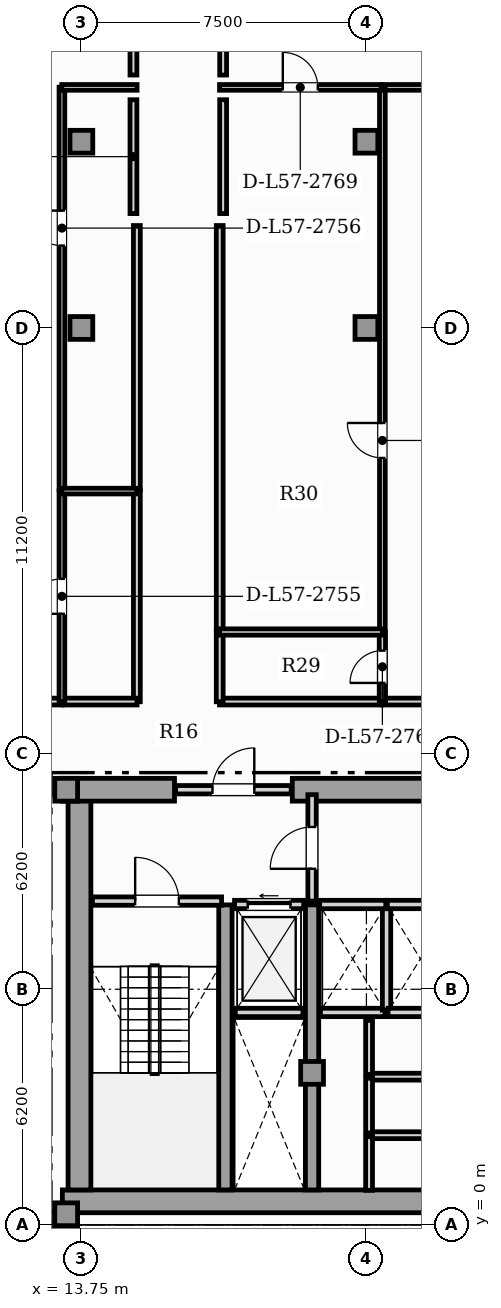
"""IFC4 building model, lengths in metres.
Left out: names, types, materials, properties, quantities, classifications, styles, units other than length and angle.
Written with IfcOpenShell. Run it as: python <this file> out.ifc"""

import sys

from ifc_helpers import new_model, si_unit, direction, frame, frame_2d, origin, origin_2d, place, context, subcontext, project, spatial, rectangle, extrude, element, fill, save


model = new_model("IFC4")
c1 = context("Model", 3, precision=1e-05, world=origin(), true_north=direction((0.0, 1.0)))
c2 = subcontext(c1, "Body", "Model", "MODEL_VIEW")
j1 = project(units=[si_unit("LENGTHUNIT", "METRE"), si_unit("PLANEANGLEUNIT", "RADIAN")], contexts=[c1])
p1 = place(None, origin())
s1 = spatial("IfcSite", under=j1, at=p1, CompositionType="ELEMENT")
p2 = place(p1, origin())
s2 = spatial("IfcBuilding", under=s1, at=p2, CompositionType="ELEMENT")
p3 = place(p2, frame((0.0, 0.0, 231.1)))
s3 = spatial("IfcBuildingStorey", under=s2, at=p3, CompositionType="ELEMENT", Elevation=231.1)
p4 = place(p3, frame((13.25, 0.62, 0.0), z_axis=(0.0, 0.0, 1.0), x_axis=(1.0, 0.0, 0.0)))
e1 = element("IfcWall", 1, at=p4, inside=s3, PredefinedType="SHEAR", context=c2, shape_type="SweptSolid", body=[
    extrude(rectangle(XDim=31.0, YDim=0.6, at=frame_2d((15.5, 0.0))), origin(), (0.0, 0.0, 1.0), 3.63),
])
p5 = place(p3, frame((13.7, 0.92, 0.0), z_axis=(0.0, 0.0, 1.0), x_axis=(0.0, 1.0, 0.0)))
e2 = element("IfcWall", 2, at=p5, inside=s3, PredefinedType="SHEAR", context=c2, shape_type="SweptSolid", body=[
    extrude(rectangle(XDim=10.53, YDim=0.6, at=frame_2d((5.265, 0.0))), origin(), (0.0, 0.0, 1.0), 3.63),
])
p6 = place(p3, frame((13.25, 11.45, 0.0), z_axis=(0.0, 0.0, 1.0), x_axis=(1.0, 0.0, 0.0)))
e3 = element("IfcWall", 3, at=p6, inside=s3, PredefinedType="SHEAR", context=c2, shape_type="SweptSolid", body=[
    extrude(rectangle(XDim=2.95, YDim=0.6, at=frame_2d((1.475, 0.0))), origin(), (0.0, 0.0, 1.0), 3.63),
])
p7 = place(p3, frame((19.3, 11.45, 0.0), z_axis=(0.0, 0.0, 1.0), x_axis=(1.0, 0.0, 0.0)))
e4 = element("IfcWall", 4, at=p7, inside=s3, PredefinedType="SHEAR", context=c2, shape_type="SweptSolid", body=[
    extrude(rectangle(XDim=7.3, YDim=0.6, at=frame_2d((3.65, 0.0))), origin(), (0.0, 0.0, 1.0), 3.63),
])
for number, where, z_axis, x_axis in (
    (5, (17.54, 0.92, 0.0), (0.0, 0.0, 1.0), (0.0, 1.0, 0.0)),
    (6, (19.82, 0.92, 0.0), (0.0, 0.0, 1.0), (0.0, 1.0, 0.0)),
):
    element("IfcWall", number, at=place(p3, frame(where, z_axis=z_axis, x_axis=x_axis)), inside=s3, PredefinedType="SHEAR", context=c2, shape_type="SweptSolid", body=[
        extrude(rectangle(XDim=7.5, YDim=0.35, at=frame_2d((3.75, 0.0))), origin(), (0.0, 0.0, 1.0), 3.63),
    ])
for number, where, z_axis, x_axis in (
    (7, (13.35, 0.28, 0.0), (0.0, 0.0, 1.0), (1.0, 0.0, 0.0)),
    (8, (13.35, 11.45, 0.0), (0.0, 0.0, 1.0), (1.0, 0.0, 0.0)),
    (9, (19.82, 4.0, 0.0), (0.0, 0.0, 1.0), (1.0, 0.0, 0.0)),
    (10, (13.75, 23.6, 0.0), (0.0, 0.0, 1.0), (1.0, 0.0, 0.0)),
    (11, (21.25, 23.6, 0.0), (0.0, 0.0, 1.0), (1.0, 0.0, 0.0)),
    (12, (13.75, 28.5, 0.0), (0.0, 0.0, 1.0), (1.0, 0.0, 0.0)),
    (13, (21.25, 28.5, 0.0), (0.0, 0.0, 1.0), (1.0, 0.0, 0.0)),
):
    element("IfcColumn", number, at=place(p3, frame(where, z_axis=z_axis, x_axis=x_axis)), inside=s3, PredefinedType="COLUMN", context=c2, shape_type="SweptSolid", body=[
        extrude(rectangle(XDim=0.6, YDim=0.6, at=origin_2d()), origin(), (0.0, 0.0, 1.0), 3.85),
    ])
p8 = place(p3, frame((10.74, 0.18, 0.0), z_axis=(0.0, 0.0, 1.0), x_axis=(1.0, 0.0, 0.0)))
e14 = element("IfcWall", 14, at=p8, inside=s3, PredefinedType="SOLIDWALL", context=c2, shape_type="SweptSolid", body=[
    extrude(rectangle(XDim=2.51, YDim=0.3, at=frame_2d((1.255, 0.0))), origin(), (0.0, 0.0, 1.0), 3.63),
])
p9 = place(p3, frame((17.8, 5.59, 0.0), z_axis=(0.0, 0.0, 1.0), x_axis=(1.0, 0.0, 0.0)))
e15 = element("IfcWall", 15, at=p9, inside=s3, PredefinedType="SOLIDWALL", context=c2, shape_type="SweptSolid", body=[
    extrude(rectangle(XDim=1.78, YDim=0.22, at=frame_2d((0.89, 0.0))), origin(), (0.0, 0.0, 1.0), 3.63),
])
p10 = place(p3, frame((17.78, 8.43, 0.0), z_axis=(0.0, 0.0, 1.0), x_axis=(1.0, 0.0, 0.0)))
e16 = element("IfcWall", 16, at=p10, inside=s3, PredefinedType="SOLIDWALL", context=c2, shape_type="SweptSolid", body=[
    extrude(rectangle(XDim=1.82, YDim=0.22, at=frame_2d((0.91, 0.0))), origin(), (0.0, 0.0, 1.0), 3.63),
])
p11 = place(p10, frame((0.35, 0.0, 0.0)))
e17 = element("IfcOpeningElement", 17, at=p11, cuts=e16, PredefinedType="OPENING", context=c2, shape_type="SweptSolid", body=[
    extrude(rectangle(XDim=1.12, YDim=2.25, at=frame_2d((0.56, 1.125))), frame((0.0, 0.12, 0.0), z_axis=(0.0, -1.0, 0.0), x_axis=(1.0, 0.0, 0.0)), (0.0, 0.0, 1.0), 0.24),
])
p12 = place(p3, frame((20.04, 5.59, 0.0), z_axis=(0.0, 0.0, 1.0), x_axis=(1.0, 0.0, 0.0)))
e18 = element("IfcWall", 18, at=p12, inside=s3, PredefinedType="SOLIDWALL", context=c2, shape_type="SweptSolid", body=[
    extrude(rectangle(XDim=1.7, YDim=0.22, at=frame_2d((0.85, 0.0))), origin(), (0.0, 0.0, 1.0), 3.63),
])
p13 = place(p3, frame((21.78, 5.65, 0.0), z_axis=(0.0, 0.0, 1.0), x_axis=(0.0, 1.0, 0.0)))
e19 = element("IfcWall", 19, at=p13, inside=s3, PredefinedType="SOLIDWALL", context=c2, shape_type="SweptSolid", body=[
    extrude(rectangle(XDim=2.7, YDim=0.22, at=frame_2d((1.35, 0.0))), origin(), (0.0, 0.0, 1.0), 3.63),
])
p14 = place(p3, frame((20.02, 8.43, 0.0), z_axis=(0.0, 0.0, 1.0), x_axis=(1.0, 0.0, 0.0)))
e20 = element("IfcWall", 20, at=p14, inside=s3, PredefinedType="SOLIDWALL", context=c2, shape_type="SweptSolid", body=[
    extrude(rectangle(XDim=1.74, YDim=0.22, at=frame_2d((0.87, 0.0))), origin(), (0.0, 0.0, 1.0), 3.63),
])
p15 = place(p3, frame((21.82, 5.59, 0.0), z_axis=(0.0, 0.0, 1.0), x_axis=(1.0, 0.0, 0.0)))
e21 = element("IfcWall", 21, at=p15, inside=s3, PredefinedType="SOLIDWALL", context=c2, shape_type="SweptSolid", body=[
    extrude(rectangle(XDim=1.7, YDim=0.22, at=frame_2d((0.85, 0.0))), origin(), (0.0, 0.0, 1.0), 3.63),
])
p16 = place(p3, frame((21.8, 8.43, 0.0), z_axis=(0.0, 0.0, 1.0), x_axis=(1.0, 0.0, 0.0)))
e22 = element("IfcWall", 22, at=p16, inside=s3, PredefinedType="SOLIDWALL", context=c2, shape_type="SweptSolid", body=[
    extrude(rectangle(XDim=1.74, YDim=0.22, at=frame_2d((0.87, 0.0))), origin(), (0.0, 0.0, 1.0), 3.63),
])
p17 = place(p3, frame((14.04, 8.52, 0.0), z_axis=(0.0, 0.0, 1.0), x_axis=(1.0, 0.0, 0.0)))
e23 = element("IfcWall", 23, at=p17, inside=s3, PredefinedType="SOLIDWALL", context=c2, shape_type="SweptSolid", body=[
    extrude(rectangle(XDim=3.4, YDim=0.22, at=frame_2d((1.7, 0.0))), origin(), (0.0, 0.0, 1.0), 3.63),
])
p18 = place(p17, frame((1.125, 0.0, 0.0)))
e24 = element("IfcOpeningElement", 24, at=p18, cuts=e23, PredefinedType="OPENING", context=c2, shape_type="SweptSolid", body=[
    extrude(rectangle(XDim=1.15, YDim=2.2, at=frame_2d((0.575, 1.1))), frame((0.0, 0.12, 0.0), z_axis=(0.0, -1.0, 0.0), x_axis=(1.0, 0.0, 0.0)), (0.0, 0.0, 1.0), 0.24),
])
p19 = place(p3, frame((19.82, 8.52, 0.0), z_axis=(0.0, 0.0, 1.0), x_axis=(0.0, 1.0, 0.0)))
e25 = element("IfcWall", 25, at=p19, inside=s3, PredefinedType="SOLIDWALL", context=c2, shape_type="SweptSolid", body=[
    extrude(rectangle(XDim=2.8, YDim=0.22, at=frame_2d((1.4, 0.0))), origin(), (0.0, 0.0, 1.0), 3.085),
])
p20 = place(p19, frame((0.85, 0.0, 0.0)))
e26 = element("IfcOpeningElement", 26, at=p20, cuts=e25, PredefinedType="OPENING", context=c2, shape_type="SweptSolid", body=[
    extrude(rectangle(XDim=1.1, YDim=2.2, at=frame_2d((0.55, 1.1))), frame((0.0, 0.12, 0.0), z_axis=(0.0, -1.0, 0.0), x_axis=(1.0, 0.0, 0.0)), (0.0, 0.0, 1.0), 0.24),
])
p21 = place(p3, frame((16.23, 11.45, 0.0), z_axis=(0.0, 0.0, 1.0), x_axis=(1.0, 0.0, 0.0)))
e27 = element("IfcWall", 27, at=p21, inside=s3, PredefinedType="SOLIDWALL", context=c2, shape_type="SweptSolid", body=[
    extrude(rectangle(XDim=3.04, YDim=0.22, at=frame_2d((1.52, 0.0))), origin(), (0.0, 0.0, 1.0), 3.63),
])
p22 = place(p21, frame((0.97, 0.0, 0.0)))
e28 = element("IfcOpeningElement", 28, at=p22, cuts=e27, PredefinedType="OPENING", context=c2, shape_type="SweptSolid", body=[
    extrude(rectangle(XDim=1.1, YDim=2.2, at=frame_2d((0.55, 1.1))), frame((0.0, 0.12, 0.0), z_axis=(0.0, -1.0, 0.0), x_axis=(1.0, 0.0, 0.0)), (0.0, 0.0, 1.0), 0.24),
])
p23 = place(p3, frame((21.36, 2.36, 0.0), z_axis=(0.0, 0.0, 1.0), x_axis=(1.0, 0.0, 0.0)))
e29 = element("IfcWall", 29, at=p23, inside=s3, PredefinedType="PARTITIONING", context=c2, shape_type="SweptSolid", body=[
    extrude(rectangle(XDim=3.94, YDim=0.18, at=frame_2d((1.97, 0.0))), origin(), (0.0, 0.0, 1.0), 3.63),
])
p24 = place(p3, frame((21.32, 0.91, 0.0), z_axis=(0.0, 0.0, 1.0), x_axis=(0.0, 1.0, 0.0)))
e30 = element("IfcWall", 30, at=p24, inside=s3, PredefinedType="PARTITIONING", context=c2, shape_type="SweptSolid", body=[
    extrude(rectangle(XDim=1.41, YDim=0.18, at=frame_2d((0.705, 0.0))), origin(), (0.0, 0.0, 1.0), 3.63),
])
p25 = place(p3, frame((21.36, 3.9, 0.0), z_axis=(0.0, 0.0, 1.0), x_axis=(1.0, 0.0, 0.0)))
e31 = element("IfcWall", 31, at=p25, inside=s3, PredefinedType="PARTITIONING", context=c2, shape_type="SweptSolid", body=[
    extrude(rectangle(XDim=3.94, YDim=0.18, at=frame_2d((1.97, 0.0))), origin(), (0.0, 0.0, 1.0), 3.63),
])
p26 = place(p3, frame((21.32, 2.42, 0.0), z_axis=(0.0, 0.0, 1.0), x_axis=(0.0, 1.0, 0.0)))
e32 = element("IfcWall", 32, at=p26, inside=s3, PredefinedType="PARTITIONING", context=c2, shape_type="SweptSolid", body=[
    extrude(rectangle(XDim=1.44, YDim=0.18, at=frame_2d((0.72, 0.0))), origin(), (0.0, 0.0, 1.0), 3.63),
])
p27 = place(p3, frame((21.32, 3.96, 0.0), z_axis=(0.0, 0.0, 1.0), x_axis=(0.0, 1.0, 0.0)))
e33 = element("IfcWall", 33, at=p27, inside=s3, PredefinedType="PARTITIONING", context=c2, shape_type="SweptSolid", body=[
    extrude(rectangle(XDim=1.42, YDim=0.18, at=frame_2d((0.71, 0.0))), origin(), (0.0, 0.0, 1.0), 3.63),
])
p28 = place(p3, frame((10.313, 13.77, 0.0), z_axis=(0.0, 0.0, 1.0), x_axis=(1.0, 0.0, 0.0)))
e34 = element("IfcWall", 34, at=p28, inside=s3, PredefinedType="PARTITIONING", context=c2, shape_type="SweptSolid", body=[
    extrude(rectangle(XDim=2.93, YDim=0.18, at=frame_2d((1.465, 0.0))), origin(), (0.0, 0.0, 1.0), 3.63),
])
p29 = place(p28, frame((0.965, 0.0, 0.0)))
e35 = element("IfcOpeningElement", 35, at=p29, cuts=e34, PredefinedType="OPENING", context=c2, shape_type="SweptSolid", body=[
    extrude(rectangle(XDim=1.0, YDim=2.15, at=frame_2d((0.5, 1.075))), frame((0.0, 0.1, 0.0), z_axis=(0.0, -1.0, 0.0), x_axis=(1.0, 0.0, 0.0)), (0.0, 0.0, 1.0), 0.2),
])
p30 = place(p3, frame((15.21, 13.765, 0.0), z_axis=(0.0, 0.0, 1.0), x_axis=(0.0, 1.0, 0.0)))
e36 = element("IfcWall", 36, at=p30, inside=s3, PredefinedType="PARTITIONING", context=c2, shape_type="SweptSolid", body=[
    extrude(rectangle(XDim=5.548, YDim=0.18, at=frame_2d((2.774, 0.0))), origin(), (0.0, 0.0, 1.0), 3.63),
])
p31 = place(p3, frame((13.273, 13.77, 0.0), z_axis=(0.0, 0.0, 1.0), x_axis=(1.0, 0.0, 0.0)))
e37 = element("IfcWall", 37, at=p31, inside=s3, PredefinedType="PARTITIONING", context=c2, shape_type="SweptSolid", body=[
    extrude(rectangle(XDim=1.942, YDim=0.18, at=frame_2d((0.971, 0.0))), origin(), (0.0, 0.0, 1.0), 3.63),
])
p32 = place(p3, frame((15.21, 19.343, 0.0), z_axis=(0.0, 0.0, 1.0), x_axis=(0.0, 1.0, 0.0)))
e38 = element("IfcWall", 38, at=p32, inside=s3, PredefinedType="PARTITIONING", context=c2, shape_type="SweptSolid", body=[
    extrude(rectangle(XDim=6.952, YDim=0.18, at=frame_2d((3.476, 0.0))), origin(), (0.0, 0.0, 1.0), 3.63),
])
p33 = place(p3, frame((21.665, 13.77, 0.0), z_axis=(0.0, 0.0, 1.0), x_axis=(1.0, 0.0, 0.0)))
e39 = element("IfcWall", 39, at=p33, inside=s3, PredefinedType="PARTITIONING", context=c2, shape_type="SweptSolid", body=[
    extrude(rectangle(XDim=8.95, YDim=0.18, at=frame_2d((4.475, 0.0))), origin(), (0.0, 0.0, 1.0), 3.63),
])
p34 = place(p33, frame((3.975, 0.0, 0.0)))
e40 = element("IfcOpeningElement", 40, at=p34, cuts=e39, PredefinedType="OPENING", context=c2, shape_type="SweptSolid", body=[
    extrude(rectangle(XDim=1.0, YDim=2.15, at=frame_2d((0.5, 1.075))), frame((0.0, 0.1, 0.0), z_axis=(0.0, -1.0, 0.0), x_axis=(1.0, 0.0, 0.0)), (0.0, 0.0, 1.0), 0.2),
])
p35 = place(p3, frame((17.385, 13.77, 0.0), z_axis=(0.0, 0.0, 1.0), x_axis=(1.0, 0.0, 0.0)))
e41 = element("IfcWall", 41, at=p35, inside=s3, PredefinedType="PARTITIONING", context=c2, shape_type="SweptSolid", body=[
    extrude(rectangle(XDim=4.25, YDim=0.18, at=frame_2d((2.125, 0.0))), origin(), (0.0, 0.0, 1.0), 3.63),
])
p36 = place(p3, frame((17.39, 13.765, 0.0), z_axis=(0.0, 0.0, 1.0), x_axis=(0.0, 1.0, 0.0)))
e42 = element("IfcWall", 42, at=p36, inside=s3, PredefinedType="PARTITIONING", context=c2, shape_type="SweptSolid", body=[
    extrude(rectangle(XDim=1.84, YDim=0.18, at=frame_2d((0.92, 0.0))), origin(), (0.0, 0.0, 1.0), 3.63),
])
p37 = place(p3, frame((17.39, 15.635, 0.0), z_axis=(0.0, 0.0, 1.0), x_axis=(0.0, 1.0, 0.0)))
e43 = element("IfcWall", 43, at=p37, inside=s3, PredefinedType="PARTITIONING", context=c2, shape_type="SweptSolid", body=[
    extrude(rectangle(XDim=10.66, YDim=0.18, at=frame_2d((5.33, 0.0))), origin(), (0.0, 0.0, 1.0), 3.63),
])
p38 = place(p3, frame((13.238, 13.765, 0.0), z_axis=(0.0, 0.0, 1.0), x_axis=(0.0, 1.0, 0.0)))
e44 = element("IfcWall", 44, at=p38, inside=s3, PredefinedType="PARTITIONING", context=c2, shape_type="SweptSolid", body=[
    extrude(rectangle(XDim=5.548, YDim=0.15, at=frame_2d((2.774, 0.0))), origin(), (0.0, 0.0, 1.0), 3.63),
])
p39 = place(p38, frame((2.314, 0.0, 0.0)))
e45 = element("IfcOpeningElement", 45, at=p39, cuts=e44, PredefinedType="OPENING", context=c2, shape_type="SweptSolid", body=[
    extrude(rectangle(XDim=0.92, YDim=2.1, at=frame_2d((0.46, 1.05))), frame((0.0, 0.085, 0.0), z_axis=(0.0, -1.0, 0.0), x_axis=(1.0, 0.0, 0.0)), (0.0, 0.0, 1.0), 0.17),
])
p40 = place(p3, frame((13.238, 19.343, 0.0), z_axis=(0.0, 0.0, 1.0), x_axis=(0.0, 1.0, 0.0)))
e46 = element("IfcWall", 46, at=p40, inside=s3, PredefinedType="PARTITIONING", context=c2, shape_type="SweptSolid", body=[
    extrude(rectangle(XDim=10.592, YDim=0.15, at=frame_2d((5.296, 0.0))), origin(), (0.0, 0.0, 1.0), 3.63),
])
p41 = place(p40, frame((6.425, 0.0, 0.0)))
e47 = element("IfcOpeningElement", 47, at=p41, cuts=e46, PredefinedType="OPENING", context=c2, shape_type="SweptSolid", body=[
    extrude(rectangle(XDim=0.92, YDim=2.1, at=frame_2d((0.46, 1.05))), frame((0.0, 0.085, 0.0), z_axis=(0.0, -1.0, 0.0), x_axis=(1.0, 0.0, 0.0)), (0.0, 0.0, 1.0), 0.17),
])
for number, where, z_axis, x_axis in (
    (48, (13.233, 29.93, 0.0), (0.0, 0.0, 1.0), (1.0, 0.0, 0.0)),
    (49, (13.233, 19.308, 0.0), (0.0, 0.0, 1.0), (1.0, 0.0, 0.0)),
):
    element("IfcWall", number, at=place(p3, frame(where, z_axis=z_axis, x_axis=x_axis)), inside=s3, PredefinedType="PARTITIONING", context=c2, shape_type="SweptSolid", body=[
        extrude(rectangle(XDim=1.982, YDim=0.15, at=frame_2d((0.991, 0.0))), origin(), (0.0, 0.0, 1.0), 3.63),
    ])
p42 = place(p3, frame((21.665, 29.93, 0.0), z_axis=(0.0, 0.0, 1.0), x_axis=(1.0, 0.0, 0.0)))
e50 = element("IfcWall", 50, at=p42, inside=s3, PredefinedType="PARTITIONING", context=c2, shape_type="SweptSolid", body=[
    extrude(rectangle(XDim=8.95, YDim=0.15, at=frame_2d((4.475, 0.0))), origin(), (0.0, 0.0, 1.0), 3.63),
])
p43 = place(p42, frame((4.015, 0.0, 0.0)))
e51 = element("IfcOpeningElement", 51, at=p43, cuts=e50, PredefinedType="OPENING", context=c2, shape_type="SweptSolid", body=[
    extrude(rectangle(XDim=0.92, YDim=2.1, at=frame_2d((0.46, 1.05))), frame((0.0, 0.085, 0.0), z_axis=(0.0, -1.0, 0.0), x_axis=(1.0, 0.0, 0.0)), (0.0, 0.0, 1.0), 0.17),
])
p44 = place(p3, frame((21.67, 13.765, 0.0), z_axis=(0.0, 0.0, 1.0), x_axis=(0.0, 1.0, 0.0)))
e52 = element("IfcWall", 52, at=p44, inside=s3, PredefinedType="PLUMBINGWALL", context=c2, shape_type="SweptSolid", body=[
    extrude(rectangle(XDim=1.84, YDim=0.165, at=frame_2d((0.92, 0.0))), origin(), (0.0, 0.0, 1.0), 3.63),
])
p45 = place(p44, frame((0.495, 0.0, 0.0)))
e53 = element("IfcOpeningElement", 53, at=p45, cuts=e52, PredefinedType="OPENING", context=c2, shape_type="SweptSolid", body=[
    extrude(rectangle(XDim=0.85, YDim=2.1, at=frame_2d((0.425, 1.05))), frame((0.0, 0.093, 0.0), z_axis=(0.0, -1.0, 0.0), x_axis=(1.0, 0.0, 0.0)), (0.0, 0.0, 1.0), 0.185),
])
p46 = place(p3, frame((21.67, 15.635, 0.0), z_axis=(0.0, 0.0, 1.0), x_axis=(0.0, 1.0, 0.0)))
e54 = element("IfcWall", 54, at=p46, inside=s3, PredefinedType="PARTITIONING", context=c2, shape_type="SweptSolid", body=[
    extrude(rectangle(XDim=14.3, YDim=0.15, at=frame_2d((7.15, 0.0))), origin(), (0.0, 0.0, 1.0), 3.63),
])
p47 = place(p46, frame((4.545, 0.0, 0.0)))
e55 = element("IfcOpeningElement", 55, at=p47, cuts=e54, PredefinedType="OPENING", context=c2, shape_type="SweptSolid", body=[
    extrude(rectangle(XDim=0.92, YDim=2.1, at=frame_2d((0.46, 1.05))), frame((0.0, 0.085, 0.0), z_axis=(0.0, -1.0, 0.0), x_axis=(1.0, 0.0, 0.0)), (0.0, 0.0, 1.0), 0.17),
])
p48 = place(p3, frame((17.385, 29.93, 0.0), z_axis=(0.0, 0.0, 1.0), x_axis=(1.0, 0.0, 0.0)))
e56 = element("IfcWall", 56, at=p48, inside=s3, PredefinedType="PARTITIONING", context=c2, shape_type="SweptSolid", body=[
    extrude(rectangle(XDim=4.25, YDim=0.15, at=frame_2d((2.125, 0.0))), origin(), (0.0, 0.0, 1.0), 3.63),
])
p49 = place(p48, frame((1.665, 0.0, 0.0)))
e57 = element("IfcOpeningElement", 57, at=p49, cuts=e56, PredefinedType="OPENING", context=c2, shape_type="SweptSolid", body=[
    extrude(rectangle(XDim=0.92, YDim=2.1, at=frame_2d((0.46, 1.05))), frame((0.0, 0.085, 0.0), z_axis=(0.0, -1.0, 0.0), x_axis=(1.0, 0.0, 0.0)), (0.0, 0.0, 1.0), 0.17),
])
p50 = place(p3, frame((17.385, 15.6, 0.0), z_axis=(0.0, 0.0, 1.0), x_axis=(1.0, 0.0, 0.0)))
e58 = element("IfcWall", 58, at=p50, inside=s3, PredefinedType="PLUMBINGWALL", context=c2, shape_type="SweptSolid", body=[
    extrude(rectangle(XDim=4.29, YDim=0.165, at=frame_2d((2.145, 0.0))), origin(), (0.0, 0.0, 1.0), 3.63),
])
p51 = place(p3, frame((15.12, 31.105, 0.0), z_axis=(0.0, 0.0, 1.0), x_axis=(0.0, -1.0, 0.0)))
e59 = element("IfcWall", 59, at=p51, inside=s3, PredefinedType="PARTITIONING", context=c2, shape_type="SweptSolid", body=[
    extrude(rectangle(XDim=0.85, YDim=0.18, at=frame_2d((0.425, 0.0))), origin(), (0.0, 0.0, 1.0), 3.63),
])
p52 = place(p3, frame((15.12, 29.605, 0.0), z_axis=(0.0, 0.0, 1.0), x_axis=(0.0, -1.0, 0.0)))
e60 = element("IfcWall", 60, at=p52, inside=s3, PredefinedType="PARTITIONING", context=c2, shape_type="SweptSolid", body=[
    extrude(rectangle(XDim=2.995, YDim=0.18, at=frame_2d((1.498, 0.0))), origin(), (0.0, 0.0, 1.0), 3.63),
])
p53 = place(p3, frame((17.48, 30.255, 0.0), z_axis=(0.0, 0.0, 1.0), x_axis=(0.0, 1.0, 0.0)))
e61 = element("IfcWall", 61, at=p53, inside=s3, PredefinedType="PARTITIONING", context=c2, shape_type="SweptSolid", body=[
    extrude(rectangle(XDim=0.85, YDim=0.18, at=frame_2d((0.425, 0.0))), origin(), (0.0, 0.0, 1.0), 3.63),
])
p54 = place(p3, frame((17.48, 26.61, 0.0), z_axis=(0.0, 0.0, 1.0), x_axis=(0.0, 1.0, 0.0)))
e62 = element("IfcWall", 62, at=p54, inside=s3, PredefinedType="PARTITIONING", context=c2, shape_type="SweptSolid", body=[
    extrude(rectangle(XDim=2.995, YDim=0.18, at=frame_2d((1.498, 0.0))), origin(), (0.0, 0.0, 1.0), 3.63),
])
p55 = place(p11, origin())
e63 = element("IfcDoor", 63, at=p55, inside=s3, OperationType="SLIDING_TO_LEFT", PredefinedType="DOOR", context=c2, shape_type="SweptSolid", body=[
    extrude(rectangle(XDim=1.12, YDim=2.25, at=frame_2d((0.56, 1.125))), frame((0.0, 0.025, 0.0), z_axis=(0.0, -1.0, 0.0), x_axis=(1.0, 0.0, 0.0)), (0.0, 0.0, 1.0), 0.05),
])
fill(e17, e63)
p56 = place(p18, origin())
e64 = element("IfcDoor", 64, at=p56, inside=s3, OperationType="SINGLE_SWING_LEFT", PredefinedType="DOOR", context=c2, shape_type="SweptSolid", body=[
    extrude(rectangle(XDim=1.15, YDim=2.2, at=frame_2d((0.575, 1.1))), frame((0.0, 0.025, 0.0), z_axis=(0.0, -1.0, 0.0), x_axis=(1.0, 0.0, 0.0)), (0.0, 0.0, 1.0), 0.05),
])
fill(e24, e64)
p57 = place(p20, origin())
e65 = element("IfcDoor", 65, at=p57, inside=s3, OperationType="SINGLE_SWING_LEFT", PredefinedType="DOOR", context=c2, shape_type="SweptSolid", body=[
    extrude(rectangle(XDim=1.1, YDim=2.2, at=frame_2d((0.55, 1.1))), frame((0.0, 0.025, 0.0), z_axis=(0.0, -1.0, 0.0), x_axis=(1.0, 0.0, 0.0)), (0.0, 0.0, 1.0), 0.05),
])
fill(e26, e65)
p58 = place(p22, origin())
e66 = element("IfcDoor", 66, at=p58, inside=s3, OperationType="SINGLE_SWING_RIGHT", PredefinedType="DOOR", context=c2, shape_type="SweptSolid", body=[
    extrude(rectangle(XDim=1.1, YDim=2.2, at=frame_2d((0.55, 1.1))), frame((0.0, 0.025, 0.0), z_axis=(0.0, -1.0, 0.0), x_axis=(1.0, 0.0, 0.0)), (0.0, 0.0, 1.0), 0.05),
])
fill(e28, e66)
p59 = place(p39, origin())
e67 = element("IfcDoor", 67, at=p59, inside=s3, OperationType="SINGLE_SWING_LEFT", PredefinedType="DOOR", context=c2, shape_type="SweptSolid", body=[
    extrude(rectangle(XDim=0.92, YDim=2.1, at=frame_2d((0.46, 1.05))), frame((0.0, 0.025, 0.0), z_axis=(0.0, -1.0, 0.0), x_axis=(1.0, 0.0, 0.0)), (0.0, 0.0, 1.0), 0.05),
])
fill(e45, e67)
p60 = place(p41, origin())
e68 = element("IfcDoor", 68, at=p60, inside=s3, OperationType="SINGLE_SWING_RIGHT", PredefinedType="DOOR", context=c2, shape_type="SweptSolid", body=[
    extrude(rectangle(XDim=0.92, YDim=2.1, at=frame_2d((0.46, 1.05))), frame((0.0, 0.025, 0.0), z_axis=(0.0, -1.0, 0.0), x_axis=(1.0, 0.0, 0.0)), (0.0, 0.0, 1.0), 0.05),
])
fill(e47, e68)
p61 = place(p45, origin())
e69 = element("IfcDoor", 69, at=p61, inside=s3, OperationType="SINGLE_SWING_LEFT", PredefinedType="DOOR", context=c2, shape_type="SweptSolid", body=[
    extrude(rectangle(XDim=0.85, YDim=2.1, at=frame_2d((0.425, 1.05))), frame((0.0, 0.025, 0.0), z_axis=(0.0, -1.0, 0.0), x_axis=(1.0, 0.0, 0.0)), (0.0, 0.0, 1.0), 0.05),
])
fill(e53, e69)
p62 = place(p47, origin())
e70 = element("IfcDoor", 70, at=p62, inside=s3, OperationType="SINGLE_SWING_RIGHT", PredefinedType="DOOR", context=c2, shape_type="SweptSolid", body=[
    extrude(rectangle(XDim=0.92, YDim=2.1, at=frame_2d((0.46, 1.05))), frame((0.0, 0.025, 0.0), z_axis=(0.0, -1.0, 0.0), x_axis=(1.0, 0.0, 0.0)), (0.0, 0.0, 1.0), 0.05),
])
fill(e55, e70)
p63 = place(p49, origin())
e71 = element("IfcDoor", 71, at=p63, inside=s3, OperationType="SINGLE_SWING_LEFT", PredefinedType="DOOR", context=c2, shape_type="SweptSolid", body=[
    extrude(rectangle(XDim=0.92, YDim=2.1, at=frame_2d((0.46, 1.05))), frame((0.0, 0.025, 0.0), z_axis=(0.0, -1.0, 0.0), x_axis=(1.0, 0.0, 0.0)), (0.0, 0.0, 1.0), 0.05),
])
fill(e57, e71)
save(model, sys.argv[1])
